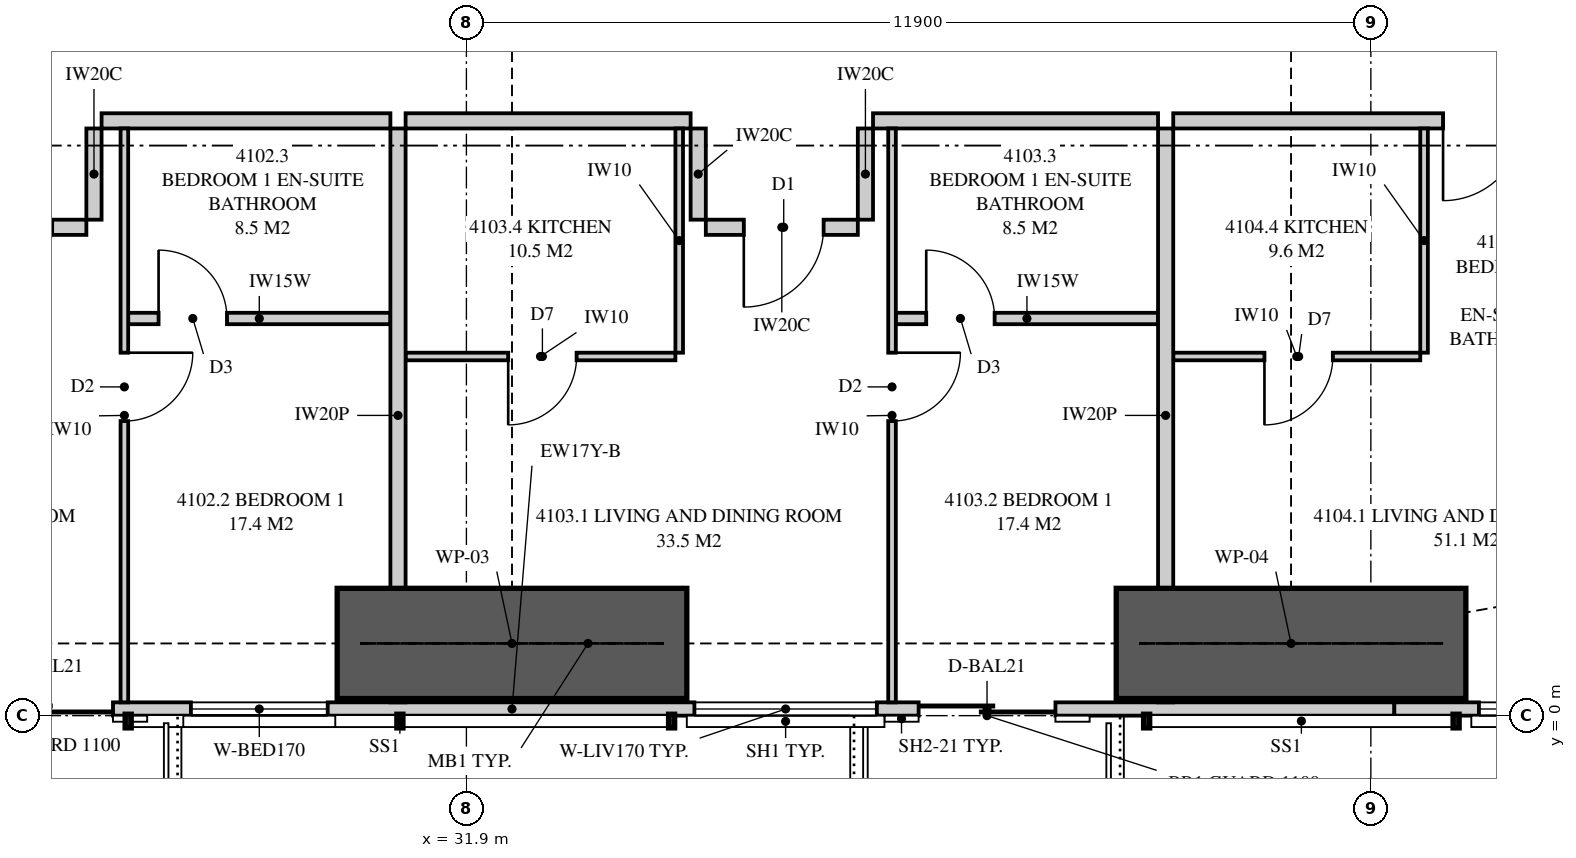
"""IFC4 building model, lengths in metres.
Left out: names, types, materials, properties, quantities, classifications, styles, units other than length and angle.
Written with IfcOpenShell. Run it as: python <this file> out.ifc"""

import sys

from ifc_helpers import new_model, si_unit, direction, frame, frame_2d, origin, place, context, subcontext, project, spatial, polyline, rectangle, outline, extrude, element, fill, save


model = new_model("IFC4")
c1 = context("Model", 3, precision=1e-05, world=origin(), true_north=direction((0.0, 1.0)))
c2 = subcontext(c1, "Body", "Model", "MODEL_VIEW")
j1 = project(units=[si_unit("LENGTHUNIT", "METRE"), si_unit("PLANEANGLEUNIT", "RADIAN")], contexts=[c1])
p1 = place(None, origin())
s1 = spatial("IfcSite", under=j1, at=p1, CompositionType="ELEMENT")
p2 = place(p1, origin())
s2 = spatial("IfcBuilding", under=s1, at=p2, CompositionType="ELEMENT")
p3 = place(p2, frame((0.0, 0.0, 154.35)))
s3 = spatial("IfcBuildingStorey", under=s2, at=p3, CompositionType="ELEMENT", Elevation=154.35)
p4 = place(p3, frame((20.891, 0.087, 0.0), z_axis=(0.0, 0.0, 1.0), x_axis=(1.0, 0.0, 0.0)))
e1 = element("IfcWall", 1, at=p4, inside=s3, PredefinedType="SOLIDWALL", context=c2, shape_type="SweptSolid", body=[
    extrude(rectangle(XDim=23.218, YDim=0.175, at=frame_2d((11.609, 0.0))), origin(), (0.0, 0.0, 1.0), 2.15),
])
p5 = place(p4, frame((4.559, 0.0, 0.0)))
e2 = element("IfcOpeningElement", 2, at=p5, cuts=e1, PredefinedType="OPENING", context=c2, shape_type="SweptSolid", body=[
    extrude(rectangle(XDim=1.8, YDim=2.1, at=frame_2d((0.9, 1.05))), frame((0.0, 0.097, 0.0), z_axis=(0.0, -1.0, 0.0), x_axis=(1.0, 0.0, 0.0)), (0.0, 0.0, 1.0), 0.195),
])
p6 = place(p4, frame((7.384, 0.0, 0.4)))
e3 = element("IfcOpeningElement", 3, at=p6, cuts=e1, PredefinedType="OPENING", context=c2, shape_type="SweptSolid", body=[
    extrude(rectangle(XDim=1.8, YDim=1.7, at=frame_2d((0.9, 0.85))), frame((0.0, 0.097, 0.0), z_axis=(0.0, -1.0, 0.0), x_axis=(1.0, 0.0, 0.0)), (0.0, 0.0, 1.0), 0.195),
])
p7 = place(p4, frame((14.009, 0.0, 0.4)))
e4 = element("IfcOpeningElement", 4, at=p7, cuts=e1, PredefinedType="OPENING", context=c2, shape_type="SweptSolid", body=[
    extrude(rectangle(XDim=2.4, YDim=1.7, at=frame_2d((1.2, 0.85))), frame((0.0, 0.097, 0.0), z_axis=(0.0, -1.0, 0.0), x_axis=(1.0, 0.0, 0.0)), (0.0, 0.0, 1.0), 0.195),
])
p8 = place(p4, frame((16.959, 0.0, 0.0)))
e5 = element("IfcOpeningElement", 5, at=p8, cuts=e1, PredefinedType="OPENING", context=c2, shape_type="SweptSolid", body=[
    extrude(rectangle(XDim=1.8, YDim=2.1, at=frame_2d((0.9, 1.05))), frame((0.0, 0.097, 0.0), z_axis=(0.0, -1.0, 0.0), x_axis=(1.0, 0.0, 0.0)), (0.0, 0.0, 1.0), 0.195),
])
p9 = place(p3, frame((44.109, 0.087, 0.0), z_axis=(0.0, 0.0, 1.0), x_axis=(1.0, 0.0, 0.0)))
e6 = element("IfcWall", 6, at=p9, inside=s3, PredefinedType="SOLIDWALL", context=c2, shape_type="SweptSolid", body=[
    extrude(rectangle(XDim=5.84, YDim=0.175, at=frame_2d((2.92, 0.0))), origin(), (0.0, 0.0, 1.0), 3.11),
])
p10 = place(p9, frame((1.113, 0.0, 0.4)))
e7 = element("IfcOpeningElement", 7, at=p10, cuts=e6, PredefinedType="OPENING", context=c2, shape_type="SweptSolid", body=[
    extrude(rectangle(XDim=2.4, YDim=1.7, at=frame_2d((1.2, 0.85))), frame((0.0, 0.097, 0.0), z_axis=(0.0, -1.0, 0.0), x_axis=(1.0, 0.0, 0.0)), (0.0, 0.0, 1.0), 0.195),
])
p11 = place(p3, frame((31.0, 0.175, 0.0), z_axis=(0.0, 0.0, 1.0), x_axis=(0.0, 1.0, 0.0)))
e8 = element("IfcWall", 8, at=p11, inside=s3, PredefinedType="PARTITIONING", context=c2, shape_type="SweptSolid", body=[
    extrude(outline(polyline([(0.529, 2.15), (0.0, 2.15), (0.0, 0.0), (0.529, 0.0), (0.529, 0.17), (1.021, 0.17), (1.021, 0.0), (7.55, 0.0), (7.55, 3.11), (1.885, 3.11), (1.885, 2.15), (1.021, 2.15), (1.021, 1.83), (0.529, 1.83), (0.529, 2.15)])), frame((0.0, 0.1, 0.0), z_axis=(0.0, -1.0, 0.0), x_axis=(1.0, 0.0, 0.0)), (0.0, 0.0, 1.0), 0.2),
])
p12 = place(p3, frame((27.4, 0.175, 0.0), z_axis=(0.0, 0.0, 1.0), x_axis=(0.0, 1.0, 0.0)))
e9 = element("IfcWall", 9, at=p12, inside=s3, PredefinedType="PARTITIONING", context=c2, shape_type="SweptSolid", body=[
    extrude(outline(polyline([(0.0, 0.0), (7.55, 0.0), (7.55, 3.11), (1.835, 3.11), (1.835, 2.15), (0.0, 2.15), (0.0, 3.11), (0.0, 0.0)])), frame((0.0, 0.05, 0.0), z_axis=(0.0, -1.0, 0.0), x_axis=(1.0, 0.0, 0.0)), (0.0, 0.0, 1.0), 0.1),
])
p13 = place(p12, frame((3.7, 0.0, 0.0)))
e10 = element("IfcOpeningElement", 10, at=p13, cuts=e9, PredefinedType="OPENING", context=c2, shape_type="SweptSolid", body=[
    extrude(rectangle(XDim=0.9, YDim=2.1, at=frame_2d((0.45, 1.05))), frame((0.0, 0.06, 0.0), z_axis=(0.0, -1.0, 0.0), x_axis=(1.0, 0.0, 0.0)), (0.0, 0.0, 1.0), 0.12),
])
p14 = place(p3, frame((27.45, 5.225, 0.0), z_axis=(0.0, 0.0, 1.0), x_axis=(1.0, 0.0, 0.0)))
e11 = element("IfcWall", 11, at=p14, inside=s3, PredefinedType="PLUMBINGWALL", context=c2, shape_type="SweptSolid", body=[
    extrude(rectangle(XDim=3.45, YDim=0.15, at=frame_2d((1.725, 0.0))), origin(), (0.0, 0.0, 1.0), 3.11),
])
p15 = place(p14, frame((0.4, 0.0, 0.0)))
e12 = element("IfcOpeningElement", 12, at=p15, cuts=e11, PredefinedType="OPENING", context=c2, shape_type="SweptSolid", body=[
    extrude(rectangle(XDim=0.9, YDim=2.1, at=frame_2d((0.45, 1.05))), frame((0.0, 0.085, 0.0), z_axis=(0.0, -1.0, 0.0), x_axis=(1.0, 0.0, 0.0)), (0.0, 0.0, 1.0), 0.17),
])
p16 = place(p3, frame((41.1, 0.175, 0.0), z_axis=(0.0, 0.0, 1.0), x_axis=(0.0, 1.0, 0.0)))
e13 = element("IfcWall", 13, at=p16, inside=s3, PredefinedType="PARTITIONING", context=c2, shape_type="SweptSolid", body=[
    extrude(outline(polyline([(0.529, 2.15), (0.0, 2.15), (0.0, 0.0), (0.529, 0.0), (0.529, 0.038), (1.021, 0.038), (1.021, 0.0), (7.55, 0.0), (7.55, 3.11), (1.885, 3.11), (1.885, 2.15), (1.021, 2.15), (1.021, 1.961), (0.529, 1.961), (0.529, 2.15)])), frame((0.0, 0.1, 0.0), z_axis=(0.0, -1.0, 0.0), x_axis=(1.0, 0.0, 0.0)), (0.0, 0.0, 1.0), 0.2),
])
p17 = place(p3, frame((31.1, 7.825, 0.0), z_axis=(0.0, 0.0, 1.0), x_axis=(1.0, 0.0, 0.0)))
e14 = element("IfcWall", 14, at=p17, inside=s3, PredefinedType="PARTITIONING", context=c2, shape_type="SweptSolid", body=[
    extrude(outline(polyline([(0.0, 0.0), (3.75, 0.0), (3.75, 3.11), (1.746, 3.11), (1.746, 2.531), (1.054, 2.531), (1.054, 3.11), (0.0, 3.11), (0.0, 0.0)])), frame((0.0, 0.1, 0.0), z_axis=(0.0, -1.0, 0.0), x_axis=(1.0, 0.0, 0.0)), (0.0, 0.0, 1.0), 0.2),
])
p18 = place(p3, frame((37.5, 0.175, 0.0), z_axis=(0.0, 0.0, 1.0), x_axis=(0.0, 1.0, 0.0)))
e15 = element("IfcWall", 15, at=p18, inside=s3, PredefinedType="PARTITIONING", context=c2, shape_type="SweptSolid", body=[
    extrude(outline(polyline([(0.0, 0.0), (7.55, 0.0), (7.55, 3.11), (1.835, 3.11), (1.835, 2.15), (0.0, 2.15), (0.0, 3.11), (0.0, 0.0)])), frame((0.0, 0.05, 0.0), z_axis=(0.0, -1.0, 0.0), x_axis=(1.0, 0.0, 0.0)), (0.0, 0.0, 1.0), 0.1),
])
p19 = place(p18, frame((3.7, 0.0, 0.0)))
e16 = element("IfcOpeningElement", 16, at=p19, cuts=e15, PredefinedType="OPENING", context=c2, shape_type="SweptSolid", body=[
    extrude(rectangle(XDim=0.9, YDim=2.1, at=frame_2d((0.45, 1.05))), frame((0.0, 0.06, 0.0), z_axis=(0.0, -1.0, 0.0), x_axis=(1.0, 0.0, 0.0)), (0.0, 0.0, 1.0), 0.12),
])
p20 = place(p3, frame((37.55, 5.225, 0.0), z_axis=(0.0, 0.0, 1.0), x_axis=(1.0, 0.0, 0.0)))
e17 = element("IfcWall", 17, at=p20, inside=s3, PredefinedType="PLUMBINGWALL", context=c2, shape_type="SweptSolid", body=[
    extrude(rectangle(XDim=3.45, YDim=0.15, at=frame_2d((1.725, 0.0))), origin(), (0.0, 0.0, 1.0), 3.11),
])
p21 = place(p20, frame((0.4, 0.0, 0.0)))
e18 = element("IfcOpeningElement", 18, at=p21, cuts=e17, PredefinedType="OPENING", context=c2, shape_type="SweptSolid", body=[
    extrude(rectangle(XDim=0.9, YDim=2.1, at=frame_2d((0.45, 1.05))), frame((0.0, 0.085, 0.0), z_axis=(0.0, -1.0, 0.0), x_axis=(1.0, 0.0, 0.0)), (0.0, 0.0, 1.0), 0.17),
])
p22 = place(p3, frame((31.1, 4.725, 0.0), z_axis=(0.0, 0.0, 1.0), x_axis=(1.0, 0.0, 0.0)))
e19 = element("IfcWall", 19, at=p22, inside=s3, PredefinedType="PARTITIONING", context=c2, shape_type="SweptSolid", body=[
    extrude(outline(polyline([(0.0, 0.0), (3.55, 0.0), (3.55, 3.11), (1.696, 3.11), (1.696, 2.531), (1.104, 2.531), (1.104, 3.11), (0.0, 3.11), (0.0, 0.0)])), frame((0.0, 0.05, 0.0), z_axis=(0.0, -1.0, 0.0), x_axis=(1.0, 0.0, 0.0)), (0.0, 0.0, 1.0), 0.1),
])
p23 = place(p22, frame((1.35, 0.0, 0.0)))
e20 = element("IfcOpeningElement", 20, at=p23, cuts=e19, PredefinedType="OPENING", context=c2, shape_type="SweptSolid", body=[
    extrude(rectangle(XDim=0.9, YDim=2.1, at=frame_2d((0.45, 1.05))), frame((0.0, 0.06, 0.0), z_axis=(0.0, -1.0, 0.0), x_axis=(1.0, 0.0, 0.0)), (0.0, 0.0, 1.0), 0.12),
])
p24 = place(p3, frame((34.7, 4.775, 0.0), z_axis=(0.0, 0.0, 1.0), x_axis=(0.0, 1.0, 0.0)))
e21 = element("IfcWall", 21, at=p24, inside=s3, PredefinedType="PARTITIONING", context=c2, shape_type="SweptSolid", body=[
    extrude(rectangle(XDim=2.95, YDim=0.1, at=frame_2d((1.475, 0.0))), origin(), (0.0, 0.0, 1.0), 3.11),
])
p25 = place(p3, frame((41.2, 7.825, 0.0), z_axis=(0.0, 0.0, 1.0), x_axis=(1.0, 0.0, 0.0)))
e22 = element("IfcWall", 22, at=p25, inside=s3, PredefinedType="PARTITIONING", context=c2, shape_type="SweptSolid", body=[
    extrude(outline(polyline([(0.0, 0.0), (4.75, 0.0), (4.75, 3.11), (1.896, 3.11), (1.896, 2.531), (1.204, 2.531), (1.204, 3.11), (0.0, 3.11), (0.0, 0.0)])), frame((0.0, 0.1, 0.0), z_axis=(0.0, -1.0, 0.0), x_axis=(1.0, 0.0, 0.0)), (0.0, 0.0, 1.0), 0.2),
])
p26 = place(p25, frame((3.55, 0.0, 0.0)))
e23 = element("IfcOpeningElement", 23, at=p26, cuts=e22, PredefinedType="OPENING", context=c2, shape_type="SweptSolid", body=[
    extrude(rectangle(XDim=1.05, YDim=2.2, at=frame_2d((0.525, 1.1))), frame((0.0, 0.11, 0.0), z_axis=(0.0, -1.0, 0.0), x_axis=(1.0, 0.0, 0.0)), (0.0, 0.0, 1.0), 0.22),
])
p27 = place(p3, frame((41.2, 4.725, 0.0), z_axis=(0.0, 0.0, 1.0), x_axis=(1.0, 0.0, 0.0)))
e24 = element("IfcWall", 24, at=p27, inside=s3, PredefinedType="PARTITIONING", context=c2, shape_type="SweptSolid", body=[
    extrude(outline(polyline([(0.0, 0.0), (3.25, 0.0), (3.25, 3.11), (1.846, 3.11), (1.846, 2.531), (1.254, 2.531), (1.254, 3.11), (0.0, 3.11), (0.0, 0.0)])), frame((0.0, 0.05, 0.0), z_axis=(0.0, -1.0, 0.0), x_axis=(1.0, 0.0, 0.0)), (0.0, 0.0, 1.0), 0.1),
])
p28 = place(p27, frame((1.2, 0.0, 0.0)))
e25 = element("IfcOpeningElement", 25, at=p28, cuts=e24, PredefinedType="OPENING", context=c2, shape_type="SweptSolid", body=[
    extrude(rectangle(XDim=0.9, YDim=2.1, at=frame_2d((0.45, 1.05))), frame((0.0, 0.06, 0.0), z_axis=(0.0, -1.0, 0.0), x_axis=(1.0, 0.0, 0.0)), (0.0, 0.0, 1.0), 0.12),
])
p29 = place(p3, frame((44.5, 4.775, 0.0), z_axis=(0.0, 0.0, 1.0), x_axis=(0.0, 1.0, 0.0)))
e26 = element("IfcWall", 26, at=p29, inside=s3, PredefinedType="PARTITIONING", context=c2, shape_type="SweptSolid", body=[
    extrude(rectangle(XDim=2.95, YDim=0.1, at=frame_2d((1.475, 0.0))), origin(), (0.0, 0.0, 1.0), 3.11),
])
p30 = place(p3, frame((27.1, 7.825, 0.0), z_axis=(0.0, 0.0, 1.0), x_axis=(1.0, 0.0, 0.0)))
e27 = element("IfcWall", 27, at=p30, inside=s3, PredefinedType="PARTITIONING", context=c2, shape_type="SweptSolid", body=[
    extrude(rectangle(XDim=3.8, YDim=0.2, at=frame_2d((1.9, 0.0))), origin(), (0.0, 0.0, 1.0), 3.11),
])
p31 = place(p3, frame((24.9, 6.425, 0.0), z_axis=(0.0, 0.0, 1.0), x_axis=(1.0, 0.0, 0.0)))
e28 = element("IfcWall", 28, at=p31, inside=s3, PredefinedType="PARTITIONING", context=c2, shape_type="SweptSolid", body=[
    extrude(rectangle(XDim=2.0, YDim=0.2, at=frame_2d((1.0, 0.0))), origin(), (0.0, 0.0, 1.0), 3.11),
])
p32 = place(p31, frame((0.5, 0.0, 0.0)))
e29 = element("IfcOpeningElement", 29, at=p32, cuts=e28, PredefinedType="OPENING", context=c2, shape_type="SweptSolid", body=[
    extrude(rectangle(XDim=1.05, YDim=2.2, at=frame_2d((0.525, 1.1))), frame((0.0, 0.11, 0.0), z_axis=(0.0, -1.0, 0.0), x_axis=(1.0, 0.0, 0.0)), (0.0, 0.0, 1.0), 0.22),
])
p33 = place(p3, frame((27.0, 7.725, 0.0), z_axis=(0.0, 0.0, 1.0), x_axis=(0.0, -1.0, 0.0)))
e30 = element("IfcWall", 30, at=p33, inside=s3, PredefinedType="PARTITIONING", context=c2, shape_type="SweptSolid", body=[
    extrude(rectangle(XDim=1.2, YDim=0.2, at=frame_2d((0.6, 0.0))), origin(), (0.0, 0.0, 1.0), 3.11),
])
p34 = place(p3, frame((37.25, 7.825, 0.0), z_axis=(0.0, 0.0, 1.0), x_axis=(1.0, 0.0, 0.0)))
e31 = element("IfcWall", 31, at=p34, inside=s3, PredefinedType="PARTITIONING", context=c2, shape_type="SweptSolid", body=[
    extrude(rectangle(XDim=3.75, YDim=0.2, at=frame_2d((1.875, 0.0))), origin(), (0.0, 0.0, 1.0), 3.11),
])
p35 = place(p3, frame((35.05, 6.425, 0.0), z_axis=(0.0, 0.0, 1.0), x_axis=(1.0, 0.0, 0.0)))
e32 = element("IfcWall", 32, at=p35, inside=s3, PredefinedType="PARTITIONING", context=c2, shape_type="SweptSolid", body=[
    extrude(rectangle(XDim=2.0, YDim=0.2, at=frame_2d((1.0, 0.0))), origin(), (0.0, 0.0, 1.0), 3.11),
])
p36 = place(p35, frame((0.5, 0.0, 0.0)))
e33 = element("IfcOpeningElement", 33, at=p36, cuts=e32, PredefinedType="OPENING", context=c2, shape_type="SweptSolid", body=[
    extrude(rectangle(XDim=1.05, YDim=2.2, at=frame_2d((0.525, 1.1))), frame((0.0, 0.11, 0.0), z_axis=(0.0, -1.0, 0.0), x_axis=(1.0, 0.0, 0.0)), (0.0, 0.0, 1.0), 0.22),
])
for number, where, z_axis, x_axis in (
    (34, (34.95, 7.725, 0.0), (0.0, 0.0, 1.0), (0.0, -1.0, 0.0)),
    (35, (37.15, 7.725, 0.0), (0.0, 0.0, 1.0), (0.0, -1.0, 0.0)),
):
    element("IfcWall", number, at=place(p3, frame(where, z_axis=z_axis, x_axis=x_axis)), inside=s3, PredefinedType="PARTITIONING", context=c2, shape_type="SweptSolid", body=[
        extrude(rectangle(XDim=1.2, YDim=0.2, at=frame_2d((0.6, 0.0))), origin(), (0.0, 0.0, 1.0), 3.11),
    ])
for number, where, z_axis, x_axis in (
    (36, (30.2, 0.95, 0.0), (0.0, 0.0, 1.0), (1.0, 0.0, 0.0)),
    (37, (40.45, 0.95, 0.0), (0.0, 0.0, 1.0), (1.0, 0.0, 0.0)),
):
    element("IfcWall", number, at=place(p3, frame(where, z_axis=z_axis, x_axis=x_axis)), inside=s3, PredefinedType="SHEAR", context=c2, shape_type="SweptSolid", body=[
        extrude(rectangle(XDim=4.6, YDim=1.45, at=frame_2d((2.3, 0.0))), origin(), (0.0, 0.0, 1.0), 3.35),
    ])
p37 = place(p5, origin())
e38 = element("IfcDoor", 38, at=p37, inside=s3, OperationType="SLIDING_TO_LEFT", PredefinedType="DOOR", context=c2, shape_type="SweptSolid", body=[
    extrude(rectangle(XDim=1.8, YDim=2.1, at=frame_2d((0.9, 1.05))), frame((0.0, 0.025, 0.0), z_axis=(0.0, -1.0, 0.0), x_axis=(1.0, 0.0, 0.0)), (0.0, 0.0, 1.0), 0.05),
])
fill(e2, e38)
p38 = place(p6, origin())
e39 = element("IfcWindow", 39, at=p38, inside=s3, PartitioningType="SINGLE_PANEL", PredefinedType="WINDOW", context=c2, shape_type="SweptSolid", body=[
    extrude(rectangle(XDim=1.8, YDim=1.7, at=frame_2d((0.9, 0.85))), frame((0.0, 0.03, 0.0), z_axis=(0.0, -1.0, 0.0), x_axis=(1.0, 0.0, 0.0)), (0.0, 0.0, 1.0), 0.06),
])
fill(e3, e39)
p39 = place(p7, origin())
e40 = element("IfcWindow", 40, at=p39, inside=s3, PartitioningType="SINGLE_PANEL", PredefinedType="WINDOW", context=c2, shape_type="SweptSolid", body=[
    extrude(rectangle(XDim=2.4, YDim=1.7, at=frame_2d((1.2, 0.85))), frame((0.0, 0.03, 0.0), z_axis=(0.0, -1.0, 0.0), x_axis=(1.0, 0.0, 0.0)), (0.0, 0.0, 1.0), 0.06),
])
fill(e4, e40)
p40 = place(p8, origin())
e41 = element("IfcDoor", 41, at=p40, inside=s3, OperationType="SLIDING_TO_LEFT", PredefinedType="DOOR", context=c2, shape_type="SweptSolid", body=[
    extrude(rectangle(XDim=1.8, YDim=2.1, at=frame_2d((0.9, 1.05))), frame((0.0, 0.025, 0.0), z_axis=(0.0, -1.0, 0.0), x_axis=(1.0, 0.0, 0.0)), (0.0, 0.0, 1.0), 0.05),
])
fill(e5, e41)
p41 = place(p10, origin())
e42 = element("IfcWindow", 42, at=p41, inside=s3, PartitioningType="SINGLE_PANEL", PredefinedType="WINDOW", context=c2, shape_type="SweptSolid", body=[
    extrude(rectangle(XDim=2.4, YDim=1.7, at=frame_2d((1.2, 0.85))), frame((0.0, 0.03, 0.0), z_axis=(0.0, -1.0, 0.0), x_axis=(1.0, 0.0, 0.0)), (0.0, 0.0, 1.0), 0.06),
])
fill(e7, e42)
p42 = place(p32, frame((1.05, 0.0, 0.0), z_axis=(0.0, 0.0, 1.0), x_axis=(-1.0, 0.0, 0.0)))
e43 = element("IfcDoor", 43, at=p42, inside=s3, OperationType="SINGLE_SWING_RIGHT", PredefinedType="DOOR", context=c2, shape_type="SweptSolid", body=[
    extrude(rectangle(XDim=1.05, YDim=2.2, at=frame_2d((0.525, 1.1))), frame((0.0, 0.025, 0.0), z_axis=(0.0, -1.0, 0.0), x_axis=(1.0, 0.0, 0.0)), (0.0, 0.0, 1.0), 0.05),
])
fill(e29, e43)
p43 = place(p13, frame((0.9, 0.0, 0.0), z_axis=(0.0, 0.0, 1.0), x_axis=(-1.0, 0.0, 0.0)))
e44 = element("IfcDoor", 44, at=p43, inside=s3, OperationType="SINGLE_SWING_LEFT", PredefinedType="DOOR", context=c2, shape_type="SweptSolid", body=[
    extrude(rectangle(XDim=0.9, YDim=2.1, at=frame_2d((0.45, 1.05))), frame((0.0, 0.025, 0.0), z_axis=(0.0, -1.0, 0.0), x_axis=(1.0, 0.0, 0.0)), (0.0, 0.0, 1.0), 0.05),
])
fill(e10, e44)
p44 = place(p15, origin())
e45 = element("IfcDoor", 45, at=p44, inside=s3, OperationType="SINGLE_SWING_LEFT", PredefinedType="DOOR", context=c2, shape_type="SweptSolid", body=[
    extrude(rectangle(XDim=0.9, YDim=2.1, at=frame_2d((0.45, 1.05))), frame((0.0, 0.025, 0.0), z_axis=(0.0, -1.0, 0.0), x_axis=(1.0, 0.0, 0.0)), (0.0, 0.0, 1.0), 0.05),
])
fill(e12, e45)
p45 = place(p36, frame((1.05, 0.0, 0.0), z_axis=(0.0, 0.0, 1.0), x_axis=(-1.0, 0.0, 0.0)))
e46 = element("IfcDoor", 46, at=p45, inside=s3, OperationType="SINGLE_SWING_RIGHT", PredefinedType="DOOR", context=c2, shape_type="SweptSolid", body=[
    extrude(rectangle(XDim=1.05, YDim=2.2, at=frame_2d((0.525, 1.1))), frame((0.0, 0.025, 0.0), z_axis=(0.0, -1.0, 0.0), x_axis=(1.0, 0.0, 0.0)), (0.0, 0.0, 1.0), 0.05),
])
fill(e33, e46)
p46 = place(p19, frame((0.9, 0.0, 0.0), z_axis=(0.0, 0.0, 1.0), x_axis=(-1.0, 0.0, 0.0)))
e47 = element("IfcDoor", 47, at=p46, inside=s3, OperationType="SINGLE_SWING_LEFT", PredefinedType="DOOR", context=c2, shape_type="SweptSolid", body=[
    extrude(rectangle(XDim=0.9, YDim=2.1, at=frame_2d((0.45, 1.05))), frame((0.0, 0.025, 0.0), z_axis=(0.0, -1.0, 0.0), x_axis=(1.0, 0.0, 0.0)), (0.0, 0.0, 1.0), 0.05),
])
fill(e16, e47)
p47 = place(p21, origin())
e48 = element("IfcDoor", 48, at=p47, inside=s3, OperationType="SINGLE_SWING_LEFT", PredefinedType="DOOR", context=c2, shape_type="SweptSolid", body=[
    extrude(rectangle(XDim=0.9, YDim=2.1, at=frame_2d((0.45, 1.05))), frame((0.0, 0.025, 0.0), z_axis=(0.0, -1.0, 0.0), x_axis=(1.0, 0.0, 0.0)), (0.0, 0.0, 1.0), 0.05),
])
fill(e18, e48)
p48 = place(p23, frame((0.9, 0.0, 0.0), z_axis=(0.0, 0.0, 1.0), x_axis=(-1.0, 0.0, 0.0)))
e49 = element("IfcDoor", 49, at=p48, inside=s3, OperationType="SINGLE_SWING_RIGHT", PredefinedType="DOOR", context=c2, shape_type="SweptSolid", body=[
    extrude(rectangle(XDim=0.9, YDim=2.1, at=frame_2d((0.45, 1.05))), frame((0.0, 0.025, 0.0), z_axis=(0.0, -1.0, 0.0), x_axis=(1.0, 0.0, 0.0)), (0.0, 0.0, 1.0), 0.05),
])
fill(e20, e49)
p49 = place(p26, frame((1.05, 0.0, 0.0), z_axis=(0.0, 0.0, 1.0), x_axis=(-1.0, 0.0, 0.0)))
e50 = element("IfcDoor", 50, at=p49, inside=s3, OperationType="SINGLE_SWING_RIGHT", PredefinedType="DOOR", context=c2, shape_type="SweptSolid", body=[
    extrude(rectangle(XDim=1.05, YDim=2.2, at=frame_2d((0.525, 1.1))), frame((0.0, 0.025, 0.0), z_axis=(0.0, -1.0, 0.0), x_axis=(1.0, 0.0, 0.0)), (0.0, 0.0, 1.0), 0.05),
])
fill(e23, e50)
p50 = place(p28, frame((0.9, 0.0, 0.0), z_axis=(0.0, 0.0, 1.0), x_axis=(-1.0, 0.0, 0.0)))
e51 = element("IfcDoor", 51, at=p50, inside=s3, OperationType="SINGLE_SWING_RIGHT", PredefinedType="DOOR", context=c2, shape_type="SweptSolid", body=[
    extrude(rectangle(XDim=0.9, YDim=2.1, at=frame_2d((0.45, 1.05))), frame((0.0, 0.025, 0.0), z_axis=(0.0, -1.0, 0.0), x_axis=(1.0, 0.0, 0.0)), (0.0, 0.0, 1.0), 0.05),
])
fill(e25, e51)
save(model, sys.argv[1])
